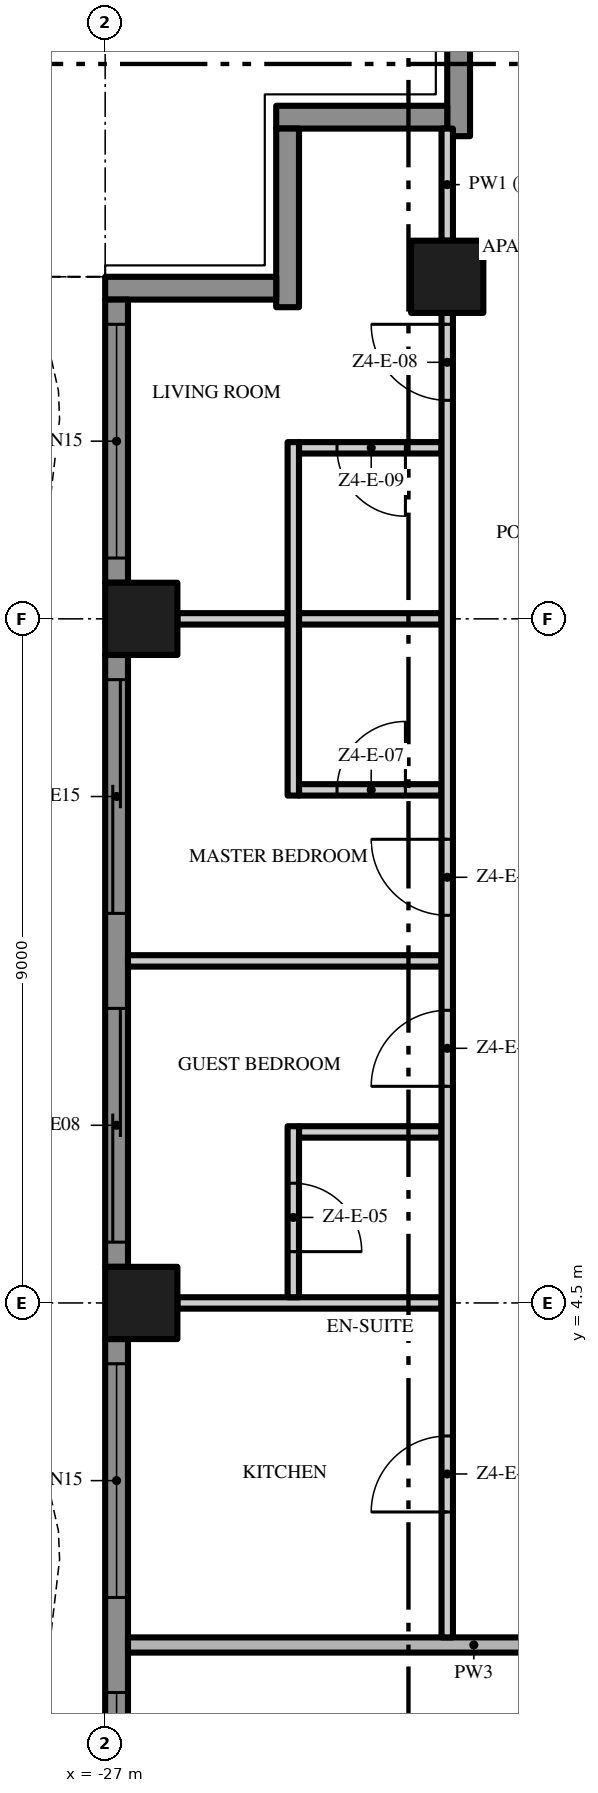
"""IFC4 building model, lengths in metres.
Left out: names, types, materials, properties, quantities, classifications, styles, units other than length and angle.
Written with IfcOpenShell. Run it as: python <this file> out.ifc"""

import sys

from ifc_helpers import new_model, si_unit, direction, frame, frame_2d, origin, origin_2d, place, context, subcontext, project, spatial, polyline, rectangle, outline, extrude, element, fill, save


model = new_model("IFC4")
c1 = context("Model", 3, precision=1e-05, world=origin(), true_north=direction((0.0, 1.0)))
c2 = subcontext(c1, "Body", "Model", "MODEL_VIEW")
j1 = project(units=[si_unit("LENGTHUNIT", "METRE"), si_unit("PLANEANGLEUNIT", "RADIAN")], contexts=[c1])
p1 = place(None, origin())
s1 = spatial("IfcSite", under=j1, at=p1, CompositionType="ELEMENT")
p2 = place(p1, origin())
s2 = spatial("IfcBuilding", under=s1, at=p2, CompositionType="ELEMENT")
p3 = place(p2, frame((0.0, 0.0, 230.0)))
s3 = spatial("IfcBuildingStorey", under=s2, at=p3, CompositionType="ELEMENT", Elevation=230.0)
for number, where, z_axis, x_axis in (
    (1, (-26.525, 13.5, 0.0), (0.0, 0.0, 1.0), (1.0, 0.0, 0.0)),
    (2, (-22.5, 18.0, 0.0), (0.0, 0.0, 1.0), (1.0, 0.0, 0.0)),
    (3, (-26.525, 4.5, 0.0), (0.0, 0.0, 1.0), (1.0, 0.0, 0.0)),
):
    element("IfcColumn", number, at=place(p3, frame(where, z_axis=z_axis, x_axis=x_axis)), inside=s3, PredefinedType="COLUMN", context=c2, shape_type="SweptSolid", body=[
        extrude(rectangle(XDim=0.95, YDim=0.95, at=origin_2d()), origin(), (0.0, 0.0, 1.0), 3.5),
    ])
p4 = place(p3, frame((-22.35, 19.85, 0.0), z_axis=(0.0, 0.0, 1.0), x_axis=(0.0, 1.0, 0.0)))
e4 = element("IfcWall", 4, at=p4, inside=s3, PredefinedType="SOLIDWALL", context=c2, shape_type="SweptSolid", body=[
    extrude(rectangle(XDim=2.35, YDim=0.3, at=frame_2d((1.175, 0.0))), origin(), (0.0, 0.0, 1.0), 3.5),
])
p5 = place(p3, frame((-24.75, 20.1, 0.0), z_axis=(0.0, 0.0, 1.0), x_axis=(1.0, 0.0, 0.0)))
e5 = element("IfcWall", 5, at=p5, inside=s3, PredefinedType="SOLIDWALL", context=c2, shape_type="SweptSolid", body=[
    extrude(rectangle(XDim=2.25, YDim=0.3, at=frame_2d((1.125, 0.0))), origin(), (0.0, 0.0, 1.0), 3.5),
])
p6 = place(p3, frame((-24.6, 17.6, 0.0), z_axis=(0.0, 0.0, 1.0), x_axis=(0.0, 1.0, 0.0)))
e6 = element("IfcWall", 6, at=p6, inside=s3, PredefinedType="SOLIDWALL", context=c2, shape_type="SweptSolid", body=[
    extrude(rectangle(XDim=2.35, YDim=0.3, at=frame_2d((1.175, 0.0))), origin(), (0.0, 0.0, 1.0), 3.5),
])
p7 = place(p3, frame((-27.0, 17.85, 0.0), z_axis=(0.0, 0.0, 1.0), x_axis=(1.0, 0.0, 0.0)))
e7 = element("IfcWall", 7, at=p7, inside=s3, PredefinedType="SOLIDWALL", context=c2, shape_type="SweptSolid", body=[
    extrude(rectangle(XDim=2.25, YDim=0.3, at=frame_2d((1.125, 0.0))), origin(), (0.0, 0.0, 1.0), 3.5),
])
p8 = place(p3, frame((-26.85, 13.975, 0.0), z_axis=(0.0, 0.0, 1.0), x_axis=(0.0, 1.0, 0.0)))
e8 = element("IfcWall", 8, at=p8, inside=s3, PredefinedType="SOLIDWALL", context=c2, shape_type="SweptSolid", body=[
    extrude(rectangle(XDim=3.725, YDim=0.3, at=frame_2d((1.863, 0.0))), origin(), (0.0, 0.0, 1.0), 3.5),
])
p9 = place(p8, frame((0.325, 0.0, 0.45)))
e9 = element("IfcOpeningElement", 9, at=p9, cuts=e8, PredefinedType="OPENING", context=c2, shape_type="SweptSolid", body=[
    extrude(rectangle(XDim=3.075, YDim=2.65, at=frame_2d((1.538, 1.325))), frame((0.0, 0.16, 0.0), z_axis=(0.0, -1.0, 0.0), x_axis=(1.0, 0.0, 0.0)), (0.0, 0.0, 1.0), 0.32),
])
p10 = place(p3, frame((-26.85, 4.975, 0.0), z_axis=(0.0, 0.0, 1.0), x_axis=(0.0, 1.0, 0.0)))
e10 = element("IfcWall", 10, at=p10, inside=s3, PredefinedType="SOLIDWALL", context=c2, shape_type="SweptSolid", body=[
    extrude(rectangle(XDim=8.05, YDim=0.3, at=frame_2d((4.025, 0.0))), origin(), (0.0, 0.0, 1.0), 3.5),
])
p11 = place(p10, frame((4.65, 0.0, 0.0)))
e11 = element("IfcOpeningElement", 11, at=p11, cuts=e10, PredefinedType="OPENING", context=c2, shape_type="SweptSolid", body=[
    extrude(rectangle(XDim=3.075, YDim=2.4, at=frame_2d((1.538, 1.2))), frame((0.0, 0.16, 0.0), z_axis=(0.0, -1.0, 0.0), x_axis=(1.0, 0.0, 0.0)), (0.0, 0.0, 1.0), 0.32),
])
p12 = place(p10, frame((0.325, 0.0, 0.0)))
e12 = element("IfcOpeningElement", 12, at=p12, cuts=e10, PredefinedType="OPENING", context=c2, shape_type="SweptSolid", body=[
    extrude(rectangle(XDim=3.075, YDim=2.4, at=frame_2d((1.538, 1.2))), frame((0.0, 0.16, 0.0), z_axis=(0.0, -1.0, 0.0), x_axis=(1.0, 0.0, 0.0)), (0.0, 0.0, 1.0), 0.32),
])
p13 = place(p3, frame((-26.85, -4.025, 0.0), z_axis=(0.0, 0.0, 1.0), x_axis=(0.0, 1.0, 0.0)))
e13 = element("IfcWall", 13, at=p13, inside=s3, PredefinedType="SOLIDWALL", context=c2, shape_type="SweptSolid", body=[
    extrude(rectangle(XDim=8.05, YDim=0.3, at=frame_2d((4.025, 0.0))), origin(), (0.0, 0.0, 1.0), 3.5),
])
p14 = place(p13, frame((4.65, 0.0, 0.45)))
e14 = element("IfcOpeningElement", 14, at=p14, cuts=e13, PredefinedType="OPENING", context=c2, shape_type="SweptSolid", body=[
    extrude(rectangle(XDim=3.075, YDim=2.65, at=frame_2d((1.538, 1.325))), frame((0.0, 0.16, 0.0), z_axis=(0.0, -1.0, 0.0), x_axis=(1.0, 0.0, 0.0)), (0.0, 0.0, 1.0), 0.32),
])
p15 = place(p13, frame((0.325, 0.0, 0.45)))
e15 = element("IfcOpeningElement", 15, at=p15, cuts=e13, PredefinedType="OPENING", context=c2, shape_type="SweptSolid", body=[
    extrude(rectangle(XDim=3.075, YDim=2.65, at=frame_2d((1.538, 1.325))), frame((0.0, 0.16, 0.0), z_axis=(0.0, -1.0, 0.0), x_axis=(1.0, 0.0, 0.0)), (0.0, 0.0, 1.0), 0.32),
])
p16 = place(p3, origin())
e16 = element("IfcWall", 16, at=p16, inside=s3, PredefinedType="USERDEFINED", context=c2, shape_type="SweptSolid", body=[
    extrude(outline(polyline([(-27.951, 18.0), (-27.615, 16.5), (-27.6, 16.125), (-27.731, 15.0), (-28.255, 13.5), (-28.988, 12.0), (-29.649, 10.5), (-29.985, 9.0), (-30.0, 8.625), (-29.869, 7.5), (-29.345, 6.0), (-28.612, 4.5), (-27.951, 3.0), (-27.615, 1.5), (-27.6, 1.125), (-27.731, 0.0), (-28.255, -1.5), (-28.988, -3.0), (-29.649, -4.5), (-29.985, -6.0), (-30.0, -6.375), (-29.869, -7.5), (-29.345, -9.0), (-28.612, -10.5), (-27.951, -12.0), (-27.615, -13.5), (-27.6, -13.875), (-27.731, -15.0), (-28.255, -16.5), (-28.988, -18.0), (-28.763, -18.11), (-28.024, -16.596), (-27.486, -15.056), (-27.349, -13.885), (-27.366, -13.467), (-27.713, -11.921), (-28.385, -10.395), (-29.114, -8.904), (-29.624, -7.444), (-29.749, -6.365), (-29.736, -6.033), (-29.41, -4.579), (-28.761, -3.105), (-28.024, -1.596), (-27.486, -0.056), (-27.349, 1.115), (-27.366, 1.533), (-27.713, 3.079), (-28.385, 4.605), (-29.114, 6.096), (-29.624, 7.556), (-29.749, 8.635), (-29.736, 8.967), (-29.41, 10.421), (-28.761, 11.895), (-28.024, 13.404), (-27.486, 14.944), (-27.349, 16.115), (-27.366, 16.533), (-27.708, 18.055), (-27.951, 18.0)])), origin(), (0.0, 0.0, 1.0), 0.9),
])
p17 = place(p3, frame((-26.7, 0.0, 0.0), z_axis=(0.0, 0.0, 1.0), x_axis=(1.0, 0.0, 0.0)))
e17 = element("IfcWall", 17, at=p17, inside=s3, PredefinedType="PARTITIONING", context=c2, shape_type="SweptSolid", body=[
    extrude(rectangle(XDim=9.1, YDim=0.2, at=frame_2d((4.55, 0.0))), origin(), (0.0, 0.0, 1.0), 3.5),
])
p18 = place(p3, frame((-26.05, 4.5, 0.0), z_axis=(0.0, 0.0, 1.0), x_axis=(1.0, 0.0, 0.0)))
e18 = element("IfcWall", 18, at=p18, inside=s3, PredefinedType="PARTITIONING", context=c2, shape_type="SweptSolid", body=[
    extrude(rectangle(XDim=3.475, YDim=0.15, at=frame_2d((1.738, 0.0))), origin(), (0.0, 0.0, 1.0), 3.5),
])
p19 = place(p3, frame((-24.45, 6.75, 0.0), z_axis=(0.0, 0.0, 1.0), x_axis=(1.0, 0.0, 0.0)))
e19 = element("IfcWall", 19, at=p19, inside=s3, PredefinedType="PARTITIONING", context=c2, shape_type="SweptSolid", body=[
    extrude(rectangle(XDim=1.875, YDim=0.15, at=frame_2d((0.938, 0.0))), origin(), (0.0, 0.0, 1.0), 3.5),
])
p20 = place(p3, frame((-26.7, 9.0, 0.0), z_axis=(0.0, 0.0, 1.0), x_axis=(1.0, 0.0, 0.0)))
e20 = element("IfcWall", 20, at=p20, inside=s3, PredefinedType="PARTITIONING", context=c2, shape_type="SweptSolid", body=[
    extrude(rectangle(XDim=4.125, YDim=0.15, at=frame_2d((2.062, 0.0))), origin(), (0.0, 0.0, 1.0), 3.5),
])
p21 = place(p3, frame((-24.45, 11.25, 0.0), z_axis=(0.0, 0.0, 1.0), x_axis=(1.0, 0.0, 0.0)))
e21 = element("IfcWall", 21, at=p21, inside=s3, PredefinedType="PARTITIONING", context=c2, shape_type="SweptSolid", body=[
    extrude(rectangle(XDim=1.875, YDim=0.15, at=frame_2d((0.938, 0.0))), origin(), (0.0, 0.0, 1.0), 3.5),
])
p22 = place(p21, frame((0.5, 0.0, 0.0)))
e22 = element("IfcOpeningElement", 22, at=p22, cuts=e21, PredefinedType="OPENING", context=c2, shape_type="SweptSolid", body=[
    extrude(rectangle(XDim=0.9, YDim=2.1, at=frame_2d((0.45, 1.05))), frame((0.0, 0.085, 0.0), z_axis=(0.0, -1.0, 0.0), x_axis=(1.0, 0.0, 0.0)), (0.0, 0.0, 1.0), 0.17),
])
p23 = place(p3, frame((-26.05, 13.5, 0.0), z_axis=(0.0, 0.0, 1.0), x_axis=(1.0, 0.0, 0.0)))
e23 = element("IfcWall", 23, at=p23, inside=s3, PredefinedType="PARTITIONING", context=c2, shape_type="SweptSolid", body=[
    extrude(rectangle(XDim=1.45, YDim=0.15, at=frame_2d((0.725, 0.0))), origin(), (0.0, 0.0, 1.0), 3.5),
])
p24 = place(p3, frame((-24.45, 13.5, 0.0), z_axis=(0.0, 0.0, 1.0), x_axis=(1.0, 0.0, 0.0)))
e24 = element("IfcWall", 24, at=p24, inside=s3, PredefinedType="PARTITIONING", context=c2, shape_type="SweptSolid", body=[
    extrude(rectangle(XDim=1.875, YDim=0.15, at=frame_2d((0.938, 0.0))), origin(), (0.0, 0.0, 1.0), 3.5),
])
p25 = place(p3, frame((-22.575, 15.75, 0.0), z_axis=(0.0, 0.0, 1.0), x_axis=(-1.0, 0.0, 0.0)))
e25 = element("IfcWall", 25, at=p25, inside=s3, PredefinedType="PARTITIONING", context=c2, shape_type="SweptSolid", body=[
    extrude(rectangle(XDim=1.875, YDim=0.15, at=frame_2d((0.938, 0.0))), origin(), (0.0, 0.0, 1.0), 3.5),
])
p26 = place(p25, frame((0.475, 0.0, 0.0)))
e26 = element("IfcOpeningElement", 26, at=p26, cuts=e25, PredefinedType="OPENING", context=c2, shape_type="SweptSolid", body=[
    extrude(rectangle(XDim=0.9, YDim=2.1, at=frame_2d((0.45, 1.05))), frame((0.0, 0.085, 0.0), z_axis=(0.0, -1.0, 0.0), x_axis=(1.0, 0.0, 0.0)), (0.0, 0.0, 1.0), 0.17),
])
p27 = place(p3, frame((-24.525, 6.825, 0.0), z_axis=(0.0, 0.0, 1.0), x_axis=(0.0, -1.0, 0.0)))
e27 = element("IfcWall", 27, at=p27, inside=s3, PredefinedType="PARTITIONING", context=c2, shape_type="SweptSolid", body=[
    extrude(rectangle(XDim=2.25, YDim=0.15, at=frame_2d((1.125, 0.0))), origin(), (0.0, 0.0, 1.0), 3.5),
])
p28 = place(p27, frame((0.75, 0.0, 0.0)))
e28 = element("IfcOpeningElement", 28, at=p28, cuts=e27, PredefinedType="OPENING", context=c2, shape_type="SweptSolid", body=[
    extrude(rectangle(XDim=0.9, YDim=2.1, at=frame_2d((0.45, 1.05))), frame((0.0, 0.085, 0.0), z_axis=(0.0, -1.0, 0.0), x_axis=(1.0, 0.0, 0.0)), (0.0, 0.0, 1.0), 0.17),
])
p29 = place(p3, frame((-24.525, 11.175, 0.0), z_axis=(0.0, 0.0, 1.0), x_axis=(0.0, 1.0, 0.0)))
e29 = element("IfcWall", 29, at=p29, inside=s3, PredefinedType="PARTITIONING", context=c2, shape_type="SweptSolid", body=[
    extrude(rectangle(XDim=4.65, YDim=0.15, at=frame_2d((2.325, 0.0))), origin(), (0.0, 0.0, 1.0), 3.5),
])
p30 = place(p3, frame((-22.5, 0.1, 0.0), z_axis=(0.0, 0.0, 1.0), x_axis=(0.0, 1.0, 0.0)))
e30 = element("IfcWall", 30, at=p30, inside=s3, PredefinedType="PARTITIONING", context=c2, shape_type="SweptSolid", body=[
    extrude(rectangle(XDim=17.425, YDim=0.15, at=frame_2d((8.713, 0.0))), origin(), (0.0, 0.0, 1.0), 3.5),
])
p31 = place(p30, frame((1.65, 0.0, 0.0)))
e31 = element("IfcOpeningElement", 31, at=p31, cuts=e30, PredefinedType="OPENING", context=c2, shape_type="SweptSolid", body=[
    extrude(rectangle(XDim=1.0, YDim=2.4, at=frame_2d((0.5, 1.2))), frame((0.0, 0.085, 0.0), z_axis=(0.0, -1.0, 0.0), x_axis=(1.0, 0.0, 0.0)), (0.0, 0.0, 1.0), 0.17),
])
p32 = place(p30, frame((7.25, 0.0, 0.0)))
e32 = element("IfcOpeningElement", 32, at=p32, cuts=e30, PredefinedType="OPENING", context=c2, shape_type="SweptSolid", body=[
    extrude(rectangle(XDim=1.0, YDim=2.4, at=frame_2d((0.5, 1.2))), frame((0.0, 0.085, 0.0), z_axis=(0.0, -1.0, 0.0), x_axis=(1.0, 0.0, 0.0)), (0.0, 0.0, 1.0), 0.17),
])
p33 = place(p30, frame((9.5, 0.0, 0.0)))
e33 = element("IfcOpeningElement", 33, at=p33, cuts=e30, PredefinedType="OPENING", context=c2, shape_type="SweptSolid", body=[
    extrude(rectangle(XDim=1.0, YDim=2.4, at=frame_2d((0.5, 1.2))), frame((0.0, 0.085, 0.0), z_axis=(0.0, -1.0, 0.0), x_axis=(1.0, 0.0, 0.0)), (0.0, 0.0, 1.0), 0.17),
])
p34 = place(p30, frame((16.275, 0.0, 0.0)))
e34 = element("IfcOpeningElement", 34, at=p34, cuts=e30, PredefinedType="OPENING", context=c2, shape_type="SweptSolid", body=[
    extrude(rectangle(XDim=1.0, YDim=2.4, at=frame_2d((0.5, 1.2))), frame((0.0, 0.085, 0.0), z_axis=(0.0, -1.0, 0.0), x_axis=(1.0, 0.0, 0.0)), (0.0, 0.0, 1.0), 0.17),
])
p35 = place(p3, frame((-22.5, 18.475, 0.0), z_axis=(0.0, 0.0, 1.0), x_axis=(0.0, 1.0, 0.0)))
e35 = element("IfcWall", 35, at=p35, inside=s3, PredefinedType="PARTITIONING", context=c2, shape_type="SweptSolid", body=[
    extrude(rectangle(XDim=1.475, YDim=0.15, at=frame_2d((0.738, 0.0))), origin(), (0.0, 0.0, 1.0), 3.5),
])
p36 = place(p9, origin())
e36 = element("IfcWindow", 36, at=p36, inside=s3, PartitioningType="SINGLE_PANEL", PredefinedType="WINDOW", context=c2, shape_type="SweptSolid", body=[
    extrude(rectangle(XDim=3.075, YDim=2.65, at=frame_2d((1.538, 1.325))), frame((0.0, 0.03, 0.0), z_axis=(0.0, -1.0, 0.0), x_axis=(1.0, 0.0, 0.0)), (0.0, 0.0, 1.0), 0.06),
])
fill(e9, e36)
p37 = place(p11, origin())
e37 = element("IfcDoor", 37, at=p37, inside=s3, OperationType="SINGLE_SWING_LEFT", PredefinedType="DOOR", context=c2, shape_type="SweptSolid", body=[
    extrude(rectangle(XDim=3.075, YDim=2.4, at=frame_2d((1.538, 1.2))), frame((0.0, 0.025, 0.0), z_axis=(0.0, -1.0, 0.0), x_axis=(1.0, 0.0, 0.0)), (0.0, 0.0, 1.0), 0.05),
])
fill(e11, e37)
p38 = place(p12, origin())
e38 = element("IfcDoor", 38, at=p38, inside=s3, OperationType="SINGLE_SWING_LEFT", PredefinedType="DOOR", context=c2, shape_type="SweptSolid", body=[
    extrude(rectangle(XDim=3.075, YDim=2.4, at=frame_2d((1.538, 1.2))), frame((0.0, 0.025, 0.0), z_axis=(0.0, -1.0, 0.0), x_axis=(1.0, 0.0, 0.0)), (0.0, 0.0, 1.0), 0.05),
])
fill(e12, e38)
p39 = place(p14, origin())
e39 = element("IfcWindow", 39, at=p39, inside=s3, PartitioningType="SINGLE_PANEL", PredefinedType="WINDOW", context=c2, shape_type="SweptSolid", body=[
    extrude(rectangle(XDim=3.075, YDim=2.65, at=frame_2d((1.538, 1.325))), frame((0.0, 0.03, 0.0), z_axis=(0.0, -1.0, 0.0), x_axis=(1.0, 0.0, 0.0)), (0.0, 0.0, 1.0), 0.06),
])
fill(e14, e39)
p40 = place(p15, origin())
e40 = element("IfcWindow", 40, at=p40, inside=s3, PartitioningType="SINGLE_PANEL", PredefinedType="WINDOW", context=c2, shape_type="SweptSolid", body=[
    extrude(rectangle(XDim=3.075, YDim=2.65, at=frame_2d((1.538, 1.325))), frame((0.0, 0.03, 0.0), z_axis=(0.0, -1.0, 0.0), x_axis=(1.0, 0.0, 0.0)), (0.0, 0.0, 1.0), 0.06),
])
fill(e15, e40)
p41 = place(p31, origin())
e41 = element("IfcDoor", 41, at=p41, inside=s3, OperationType="SINGLE_SWING_LEFT", PredefinedType="DOOR", context=c2, shape_type="SweptSolid", body=[
    extrude(rectangle(XDim=1.0, YDim=2.4, at=frame_2d((0.5, 1.2))), frame((0.0, 0.025, 0.0), z_axis=(0.0, -1.0, 0.0), x_axis=(1.0, 0.0, 0.0)), (0.0, 0.0, 1.0), 0.05),
])
fill(e31, e41)
p42 = place(p32, origin())
e42 = element("IfcDoor", 42, at=p42, inside=s3, OperationType="SINGLE_SWING_LEFT", PredefinedType="DOOR", context=c2, shape_type="SweptSolid", body=[
    extrude(rectangle(XDim=1.0, YDim=2.4, at=frame_2d((0.5, 1.2))), frame((0.0, 0.025, 0.0), z_axis=(0.0, -1.0, 0.0), x_axis=(1.0, 0.0, 0.0)), (0.0, 0.0, 1.0), 0.05),
])
fill(e32, e42)
p43 = place(p28, origin())
e43 = element("IfcDoor", 43, at=p43, inside=s3, OperationType="SINGLE_SWING_RIGHT", PredefinedType="DOOR", context=c2, shape_type="SweptSolid", body=[
    extrude(rectangle(XDim=0.9, YDim=2.1, at=frame_2d((0.45, 1.05))), frame((0.0, 0.025, 0.0), z_axis=(0.0, -1.0, 0.0), x_axis=(1.0, 0.0, 0.0)), (0.0, 0.0, 1.0), 0.05),
])
fill(e28, e43)
p44 = place(p33, origin())
e44 = element("IfcDoor", 44, at=p44, inside=s3, OperationType="SINGLE_SWING_RIGHT", PredefinedType="DOOR", context=c2, shape_type="SweptSolid", body=[
    extrude(rectangle(XDim=1.0, YDim=2.4, at=frame_2d((0.5, 1.2))), frame((0.0, 0.025, 0.0), z_axis=(0.0, -1.0, 0.0), x_axis=(1.0, 0.0, 0.0)), (0.0, 0.0, 1.0), 0.05),
])
fill(e33, e44)
p45 = place(p22, origin())
e45 = element("IfcDoor", 45, at=p45, inside=s3, OperationType="SINGLE_SWING_RIGHT", PredefinedType="DOOR", context=c2, shape_type="SweptSolid", body=[
    extrude(rectangle(XDim=0.9, YDim=2.1, at=frame_2d((0.45, 1.05))), frame((0.0, 0.025, 0.0), z_axis=(0.0, -1.0, 0.0), x_axis=(1.0, 0.0, 0.0)), (0.0, 0.0, 1.0), 0.05),
])
fill(e22, e45)
p46 = place(p34, origin())
e46 = element("IfcDoor", 46, at=p46, inside=s3, OperationType="SINGLE_SWING_RIGHT", PredefinedType="DOOR", context=c2, shape_type="SweptSolid", body=[
    extrude(rectangle(XDim=1.0, YDim=2.4, at=frame_2d((0.5, 1.2))), frame((0.0, 0.025, 0.0), z_axis=(0.0, -1.0, 0.0), x_axis=(1.0, 0.0, 0.0)), (0.0, 0.0, 1.0), 0.05),
])
fill(e34, e46)
p47 = place(p26, origin())
e47 = element("IfcDoor", 47, at=p47, inside=s3, OperationType="SINGLE_SWING_LEFT", PredefinedType="DOOR", context=c2, shape_type="SweptSolid", body=[
    extrude(rectangle(XDim=0.9, YDim=2.1, at=frame_2d((0.45, 1.05))), frame((0.0, 0.025, 0.0), z_axis=(0.0, -1.0, 0.0), x_axis=(1.0, 0.0, 0.0)), (0.0, 0.0, 1.0), 0.05),
])
fill(e26, e47)
save(model, sys.argv[1])
